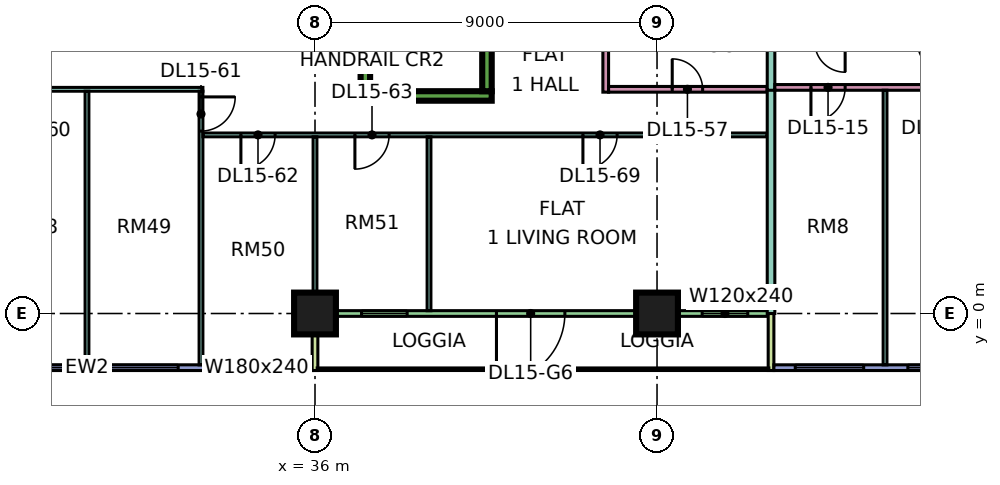
"""IFC4 building model, lengths in metres.
Left out: names, types, materials, properties, quantities, classifications, styles, units other than length and angle.
Written with IfcOpenShell. Run it as: python <this file> out.ifc"""

import sys

from ifc_helpers import new_model, si_unit, direction, frame, frame_2d, origin, origin_2d, place, context, subcontext, project, spatial, rectangle, extrude, element, fill, save


model = new_model("IFC4")
c1 = context("Model", 3, precision=1e-05, world=origin(), true_north=direction((0.0, 1.0)))
c2 = subcontext(c1, "Body", "Model", "MODEL_VIEW")
j1 = project(units=[si_unit("LENGTHUNIT", "METRE"), si_unit("PLANEANGLEUNIT", "RADIAN")], contexts=[c1])
p1 = place(None, origin())
s1 = spatial("IfcSite", under=j1, at=p1, CompositionType="ELEMENT")
p2 = place(p1, origin())
s2 = spatial("IfcBuilding", under=s1, at=p2, CompositionType="ELEMENT")
p3 = place(p2, frame((0.0, 0.0, 71.4)))
s3 = spatial("IfcBuildingStorey", under=s2, at=p3, CompositionType="ELEMENT", Elevation=71.4)
for number, where, z_axis, x_axis in (
    (1, (36.0, 0.0, 0.0), (0.0, 0.0, 1.0), (1.0, 0.0, 0.0)),
    (2, (45.0, 0.0, 0.0), (0.0, 0.0, 1.0), (1.0, 0.0, 0.0)),
):
    element("IfcColumn", number, at=place(p3, frame(where, z_axis=z_axis, x_axis=x_axis)), inside=s3, PredefinedType="COLUMN", context=c2, shape_type="SweptSolid", body=[
        extrude(rectangle(XDim=1.1, YDim=1.1, at=origin_2d()), origin(), (0.0, 0.0, 1.0), 3.75),
    ])
p4 = place(p3, frame((37.2, 5.725, 0.0), z_axis=(0.0, 0.0, 1.0), x_axis=(1.0, 0.0, 0.0)))
e3 = element("IfcWall", 3, at=p4, inside=s3, PredefinedType="SHEAR", context=c2, shape_type="SweptSolid", body=[
    extrude(rectangle(XDim=3.45, YDim=0.25, at=frame_2d((1.725, 0.0))), origin(), (0.0, 0.0, 1.0), 3.75),
])
for number, where, z_axis, x_axis in (
    (4, (37.325, 5.85, 0.0), (0.0, 0.0, 1.0), (0.0, 1.0, 0.0)),
    (5, (40.525, 5.85, 0.0), (0.0, 0.0, 1.0), (0.0, 1.0, 0.0)),
):
    element("IfcWall", number, at=place(p3, frame(where, z_axis=z_axis, x_axis=x_axis)), inside=s3, PredefinedType="SHEAR", context=c2, shape_type="SweptSolid", body=[
        extrude(rectangle(XDim=6.5, YDim=0.25, at=frame_2d((3.25, 0.0))), origin(), (0.0, 0.0, 1.0), 3.75),
    ])
p5 = place(p3, frame((24.075, -1.425, 0.0), z_axis=(0.0, 0.0, 1.0), x_axis=(1.0, 0.0, 0.0)))
e6 = element("IfcWall", 6, at=p5, inside=s3, PredefinedType="SOLIDWALL", context=c2, shape_type="SweptSolid", body=[
    extrude(rectangle(XDim=11.85, YDim=0.15, at=frame_2d((5.925, 0.0))), origin(), (0.0, 0.0, 1.0), 3.35),
])
p6 = place(p5, frame((0.562, 0.0, 0.45)))
e7 = element("IfcOpeningElement", 7, at=p6, cuts=e6, PredefinedType="OPENING", context=c2, shape_type="SweptSolid", body=[
    extrude(rectangle(XDim=1.8, YDim=2.4, at=frame_2d((0.9, 1.2))), frame((0.0, 0.085, 0.0), z_axis=(0.0, -1.0, 0.0), x_axis=(1.0, 0.0, 0.0)), (0.0, 0.0, 1.0), 0.17),
])
p7 = place(p5, frame((3.525, 0.0, 0.45)))
e8 = element("IfcOpeningElement", 8, at=p7, cuts=e6, PredefinedType="OPENING", context=c2, shape_type="SweptSolid", body=[
    extrude(rectangle(XDim=1.8, YDim=2.4, at=frame_2d((0.9, 1.2))), frame((0.0, 0.085, 0.0), z_axis=(0.0, -1.0, 0.0), x_axis=(1.0, 0.0, 0.0)), (0.0, 0.0, 1.0), 0.17),
])
p8 = place(p5, frame((6.525, 0.0, 0.45)))
e9 = element("IfcOpeningElement", 9, at=p8, cuts=e6, PredefinedType="OPENING", context=c2, shape_type="SweptSolid", body=[
    extrude(rectangle(XDim=1.8, YDim=2.4, at=frame_2d((0.9, 1.2))), frame((0.0, 0.085, 0.0), z_axis=(0.0, -1.0, 0.0), x_axis=(1.0, 0.0, 0.0)), (0.0, 0.0, 1.0), 0.17),
])
p9 = place(p5, frame((9.488, 0.0, 0.45)))
e10 = element("IfcOpeningElement", 10, at=p9, cuts=e6, PredefinedType="OPENING", context=c2, shape_type="SweptSolid", body=[
    extrude(rectangle(XDim=1.8, YDim=2.4, at=frame_2d((0.9, 1.2))), frame((0.0, 0.085, 0.0), z_axis=(0.0, -1.0, 0.0), x_axis=(1.0, 0.0, 0.0)), (0.0, 0.0, 1.0), 0.17),
])
p10 = place(p3, frame((36.075, 0.0, 0.0), z_axis=(0.0, 0.0, 1.0), x_axis=(1.0, 0.0, 0.0)))
e11 = element("IfcWall", 11, at=p10, inside=s3, PredefinedType="SOLIDWALL", context=c2, shape_type="SweptSolid", body=[
    extrude(rectangle(XDim=11.85, YDim=0.15, at=frame_2d((5.925, 0.0))), origin(), (0.0, 0.0, 1.0), 3.35),
])
p11 = place(p10, frame((1.15, 0.0, 0.45)))
e12 = element("IfcOpeningElement", 12, at=p11, cuts=e11, PredefinedType="OPENING", context=c2, shape_type="SweptSolid", body=[
    extrude(rectangle(XDim=1.2, YDim=2.4, at=frame_2d((0.6, 1.2))), frame((0.0, 0.085, 0.0), z_axis=(0.0, -1.0, 0.0), x_axis=(1.0, 0.0, 0.0)), (0.0, 0.0, 1.0), 0.17),
])
p12 = place(p10, frame((4.7, 0.0, 0.0)))
e13 = element("IfcOpeningElement", 13, at=p12, cuts=e11, PredefinedType="OPENING", context=c2, shape_type="SweptSolid", body=[
    extrude(rectangle(XDim=1.8, YDim=2.4, at=frame_2d((0.9, 1.2))), frame((0.0, 0.085, 0.0), z_axis=(0.0, -1.0, 0.0), x_axis=(1.0, 0.0, 0.0)), (0.0, 0.0, 1.0), 0.17),
])
p13 = place(p10, frame((10.113, 0.0, 0.45)))
e14 = element("IfcOpeningElement", 14, at=p13, cuts=e11, PredefinedType="OPENING", context=c2, shape_type="SweptSolid", body=[
    extrude(rectangle(XDim=1.2, YDim=2.4, at=frame_2d((0.6, 1.2))), frame((0.0, 0.085, 0.0), z_axis=(0.0, -1.0, 0.0), x_axis=(1.0, 0.0, 0.0)), (0.0, 0.0, 1.0), 0.17),
])
for number, where, z_axis, x_axis in (
    (15, (36.0, -1.5, 0.0), (0.0, 0.0, 1.0), (0.0, 1.0, 0.0)),
    (16, (48.0, -1.5, 0.0), (0.0, 0.0, 1.0), (0.0, 1.0, 0.0)),
):
    element("IfcWall", number, at=place(p3, frame(where, z_axis=z_axis, x_axis=x_axis)), inside=s3, PredefinedType="SOLIDWALL", context=c2, shape_type="SweptSolid", body=[
        extrude(rectangle(XDim=1.5, YDim=0.15, at=frame_2d((0.75, 0.0))), origin(), (0.0, 0.0, 1.0), 3.35),
    ])
p14 = place(p3, frame((48.075, -1.425, 0.0), z_axis=(0.0, 0.0, 1.0), x_axis=(1.0, 0.0, 0.0)))
e17 = element("IfcWall", 17, at=p14, inside=s3, PredefinedType="SOLIDWALL", context=c2, shape_type="SweptSolid", body=[
    extrude(rectangle(XDim=11.85, YDim=0.15, at=frame_2d((5.925, 0.0))), origin(), (0.0, 0.0, 1.0), 3.35),
])
p15 = place(p14, frame((0.562, 0.0, 0.45)))
e18 = element("IfcOpeningElement", 18, at=p15, cuts=e17, PredefinedType="OPENING", context=c2, shape_type="SweptSolid", body=[
    extrude(rectangle(XDim=1.8, YDim=2.4, at=frame_2d((0.9, 1.2))), frame((0.0, 0.085, 0.0), z_axis=(0.0, -1.0, 0.0), x_axis=(1.0, 0.0, 0.0)), (0.0, 0.0, 1.0), 0.17),
])
p16 = place(p14, frame((3.525, 0.0, 0.45)))
e19 = element("IfcOpeningElement", 19, at=p16, cuts=e17, PredefinedType="OPENING", context=c2, shape_type="SweptSolid", body=[
    extrude(rectangle(XDim=1.8, YDim=2.4, at=frame_2d((0.9, 1.2))), frame((0.0, 0.085, 0.0), z_axis=(0.0, -1.0, 0.0), x_axis=(1.0, 0.0, 0.0)), (0.0, 0.0, 1.0), 0.17),
])
p17 = place(p14, frame((6.525, 0.0, 0.45)))
e20 = element("IfcOpeningElement", 20, at=p17, cuts=e17, PredefinedType="OPENING", context=c2, shape_type="SweptSolid", body=[
    extrude(rectangle(XDim=1.8, YDim=2.4, at=frame_2d((0.9, 1.2))), frame((0.0, 0.085, 0.0), z_axis=(0.0, -1.0, 0.0), x_axis=(1.0, 0.0, 0.0)), (0.0, 0.0, 1.0), 0.17),
])
p18 = place(p14, frame((9.488, 0.0, 0.45)))
e21 = element("IfcOpeningElement", 21, at=p18, cuts=e17, PredefinedType="OPENING", context=c2, shape_type="SweptSolid", body=[
    extrude(rectangle(XDim=1.8, YDim=2.4, at=frame_2d((0.9, 1.2))), frame((0.0, 0.085, 0.0), z_axis=(0.0, -1.0, 0.0), x_axis=(1.0, 0.0, 0.0)), (0.0, 0.0, 1.0), 0.17),
])
p19 = place(p3, frame((11.95, 5.9, 0.0), z_axis=(0.0, 0.0, 1.0), x_axis=(1.0, 0.0, 0.0)))
e22 = element("IfcWall", 22, at=p19, inside=s3, PredefinedType="PARTITIONING", context=c2, shape_type="SweptSolid", body=[
    extrude(rectangle(XDim=21.1, YDim=0.1, at=frame_2d((10.55, 0.0))), origin(), (0.0, 0.0, 1.0), 3.35),
])
p20 = place(p19, frame((10.1, 0.0, 0.0)))
e23 = element("IfcOpeningElement", 23, at=p20, cuts=e22, PredefinedType="OPENING", context=c2, shape_type="SweptSolid", body=[
    extrude(rectangle(XDim=0.9, YDim=2.1, at=frame_2d((0.45, 1.05))), frame((0.0, 0.06, 0.0), z_axis=(0.0, -1.0, 0.0), x_axis=(1.0, 0.0, 0.0)), (0.0, 0.0, 1.0), 0.12),
])
p21 = place(p19, frame((13.1, 0.0, 0.0)))
e24 = element("IfcOpeningElement", 24, at=p21, cuts=e22, PredefinedType="OPENING", context=c2, shape_type="SweptSolid", body=[
    extrude(rectangle(XDim=0.9, YDim=2.1, at=frame_2d((0.45, 1.05))), frame((0.0, 0.06, 0.0), z_axis=(0.0, -1.0, 0.0), x_axis=(1.0, 0.0, 0.0)), (0.0, 0.0, 1.0), 0.12),
])
p22 = place(p19, frame((16.1, 0.0, 0.0)))
e25 = element("IfcOpeningElement", 25, at=p22, cuts=e22, PredefinedType="OPENING", context=c2, shape_type="SweptSolid", body=[
    extrude(rectangle(XDim=0.9, YDim=2.1, at=frame_2d((0.45, 1.05))), frame((0.0, 0.06, 0.0), z_axis=(0.0, -1.0, 0.0), x_axis=(1.0, 0.0, 0.0)), (0.0, 0.0, 1.0), 0.12),
])
p23 = place(p19, frame((4.1, 0.0, 0.0)))
e26 = element("IfcOpeningElement", 26, at=p23, cuts=e22, PredefinedType="OPENING", context=c2, shape_type="SweptSolid", body=[
    extrude(rectangle(XDim=0.9, YDim=2.1, at=frame_2d((0.45, 1.05))), frame((0.0, 0.06, 0.0), z_axis=(0.0, -1.0, 0.0), x_axis=(1.0, 0.0, 0.0)), (0.0, 0.0, 1.0), 0.12),
])
p24 = place(p3, frame((30.0, -1.351, 0.0), z_axis=(0.0, 0.0, 1.0), x_axis=(0.0, 1.0, 0.0)))
e27 = element("IfcWall", 27, at=p24, inside=s3, PredefinedType="PARTITIONING", context=c2, shape_type="SweptSolid", body=[
    extrude(rectangle(XDim=7.201, YDim=0.1, at=frame_2d((3.601, 0.0))), origin(), (0.0, 0.0, 1.0), 3.35),
])
p25 = place(p3, frame((33.0, -1.351, 0.0), z_axis=(0.0, 0.0, 1.0), x_axis=(0.0, 1.0, 0.0)))
e28 = element("IfcWall", 28, at=p25, inside=s3, PredefinedType="PARTITIONING", context=c2, shape_type="SweptSolid", body=[
    extrude(rectangle(XDim=7.201, YDim=0.1, at=frame_2d((3.601, 0.0))), origin(), (0.0, 0.0, 1.0), 3.35),
])
p26 = place(p25, frame((6.151, 0.0, 0.0)))
e29 = element("IfcOpeningElement", 29, at=p26, cuts=e28, PredefinedType="OPENING", context=c2, shape_type="SweptSolid", body=[
    extrude(rectangle(XDim=0.9, YDim=2.1, at=frame_2d((0.45, 1.05))), frame((0.0, 0.06, 0.0), z_axis=(0.0, -1.0, 0.0), x_axis=(1.0, 0.0, 0.0)), (0.0, 0.0, 1.0), 0.12),
])
p27 = place(p3, frame((33.05, 4.7, 0.0), z_axis=(0.0, 0.0, 1.0), x_axis=(1.0, 0.0, 0.0)))
e30 = element("IfcWall", 30, at=p27, inside=s3, PredefinedType="PARTITIONING", context=c2, shape_type="SweptSolid", body=[
    extrude(rectangle(XDim=14.85, YDim=0.1, at=frame_2d((7.425, 0.0))), origin(), (0.0, 0.0, 1.0), 3.35),
])
p28 = place(p27, frame((1.0, 0.0, 0.0)))
e31 = element("IfcOpeningElement", 31, at=p28, cuts=e30, PredefinedType="OPENING", context=c2, shape_type="SweptSolid", body=[
    extrude(rectangle(XDim=0.9, YDim=2.1, at=frame_2d((0.45, 1.05))), frame((0.0, 0.06, 0.0), z_axis=(0.0, -1.0, 0.0), x_axis=(1.0, 0.0, 0.0)), (0.0, 0.0, 1.0), 0.12),
])
p29 = place(p27, frame((4.0, 0.0, 0.0)))
e32 = element("IfcOpeningElement", 32, at=p29, cuts=e30, PredefinedType="OPENING", context=c2, shape_type="SweptSolid", body=[
    extrude(rectangle(XDim=0.9, YDim=2.1, at=frame_2d((0.45, 1.05))), frame((0.0, 0.06, 0.0), z_axis=(0.0, -1.0, 0.0), x_axis=(1.0, 0.0, 0.0)), (0.0, 0.0, 1.0), 0.12),
])
p30 = place(p27, frame((10.0, 0.0, 0.0)))
e33 = element("IfcOpeningElement", 33, at=p30, cuts=e30, PredefinedType="OPENING", context=c2, shape_type="SweptSolid", body=[
    extrude(rectangle(XDim=0.9, YDim=2.1, at=frame_2d((0.45, 1.05))), frame((0.0, 0.06, 0.0), z_axis=(0.0, -1.0, 0.0), x_axis=(1.0, 0.0, 0.0)), (0.0, 0.0, 1.0), 0.12),
])
p31 = place(p3, frame((36.0, 0.0, 0.0), z_axis=(0.0, 0.0, 1.0), x_axis=(0.0, 1.0, 0.0)))
e34 = element("IfcWall", 34, at=p31, inside=s3, PredefinedType="PARTITIONING", context=c2, shape_type="SweptSolid", body=[
    extrude(rectangle(XDim=4.65, YDim=0.1, at=frame_2d((2.325, 0.0))), origin(), (0.0, 0.0, 1.0), 3.35),
])
p32 = place(p3, frame((39.0, 0.074, 0.0), z_axis=(0.0, 0.0, 1.0), x_axis=(0.0, 1.0, 0.0)))
e35 = element("IfcWall", 35, at=p32, inside=s3, PredefinedType="PARTITIONING", context=c2, shape_type="SweptSolid", body=[
    extrude(rectangle(XDim=4.576, YDim=0.1, at=frame_2d((2.288, 0.0))), origin(), (0.0, 0.0, 1.0), 3.35),
])
p33 = place(p3, frame((43.65, 5.825, 0.0), z_axis=(0.0, 0.0, 1.0), x_axis=(0.0, 1.0, 0.0)))
e36 = element("IfcWall", 36, at=p33, inside=s3, PredefinedType="PARTITIONING", context=c2, shape_type="SweptSolid", body=[
    extrude(rectangle(XDim=6.625, YDim=0.15, at=frame_2d((3.312, 0.0))), origin(), (0.0, 0.0, 1.0), 3.35),
])
p34 = place(p33, frame((4.425, 0.0, 0.0)))
e37 = element("IfcOpeningElement", 37, at=p34, cuts=e36, PredefinedType="OPENING", context=c2, shape_type="SweptSolid", body=[
    extrude(rectangle(XDim=0.9, YDim=2.1, at=frame_2d((0.45, 1.05))), frame((0.0, 0.085, 0.0), z_axis=(0.0, -1.0, 0.0), x_axis=(1.0, 0.0, 0.0)), (0.0, 0.0, 1.0), 0.17),
])
p35 = place(p3, frame((43.725, 5.9, 0.0), z_axis=(0.0, 0.0, 1.0), x_axis=(1.0, 0.0, 0.0)))
e38 = element("IfcWall", 38, at=p35, inside=s3, PredefinedType="PARTITIONING", context=c2, shape_type="SweptSolid", body=[
    extrude(rectangle(XDim=4.175, YDim=0.15, at=frame_2d((2.087, 0.0))), origin(), (0.0, 0.0, 1.0), 3.35),
])
p36 = place(p35, frame((1.675, 0.0, 0.0)))
e39 = element("IfcOpeningElement", 39, at=p36, cuts=e38, PredefinedType="OPENING", context=c2, shape_type="SweptSolid", body=[
    extrude(rectangle(XDim=0.8, YDim=2.1, at=frame_2d((0.4, 1.05))), frame((0.0, 0.085, 0.0), z_axis=(0.0, -1.0, 0.0), x_axis=(1.0, 0.0, 0.0)), (0.0, 0.0, 1.0), 0.17),
])
p37 = place(p3, frame((48.0, 0.0, 0.0), z_axis=(0.0, 0.0, 1.0), x_axis=(0.0, 1.0, 0.0)))
e40 = element("IfcWall", 40, at=p37, inside=s3, PredefinedType="PARTITIONING", context=c2, shape_type="SweptSolid", body=[
    extrude(rectangle(XDim=5.975, YDim=0.2, at=frame_2d((2.988, 0.0))), origin(), (0.0, 0.0, 1.0), 3.35),
])
p38 = place(p3, frame((48.0, 5.875, 0.0), z_axis=(0.0, 0.0, 1.0), x_axis=(0.0, 1.0, 0.0)))
e41 = element("IfcWall", 41, at=p38, inside=s3, PredefinedType="PARTITIONING", context=c2, shape_type="SweptSolid", body=[
    extrude(rectangle(XDim=6.575, YDim=0.2, at=frame_2d((3.288, 0.0))), origin(), (0.0, 0.0, 1.0), 3.35),
])
p39 = place(p3, frame((48.1, 5.95, 0.0), z_axis=(0.0, 0.0, 1.0), x_axis=(1.0, 0.0, 0.0)))
e42 = element("IfcWall", 42, at=p39, inside=s3, PredefinedType="PARTITIONING", context=c2, shape_type="SweptSolid", body=[
    extrude(rectangle(XDim=25.25, YDim=0.15, at=frame_2d((12.625, 0.0))), origin(), (0.0, 0.0, 1.0), 3.35),
])
p40 = place(p39, frame((0.95, 0.0, 0.0)))
e43 = element("IfcOpeningElement", 43, at=p40, cuts=e42, PredefinedType="OPENING", context=c2, shape_type="SweptSolid", body=[
    extrude(rectangle(XDim=0.9, YDim=2.1, at=frame_2d((0.45, 1.05))), frame((0.0, 0.085, 0.0), z_axis=(0.0, -1.0, 0.0), x_axis=(1.0, 0.0, 0.0)), (0.0, 0.0, 1.0), 0.17),
])
p41 = place(p39, frame((3.95, 0.0, 0.0)))
e44 = element("IfcOpeningElement", 44, at=p41, cuts=e42, PredefinedType="OPENING", context=c2, shape_type="SweptSolid", body=[
    extrude(rectangle(XDim=0.9, YDim=2.1, at=frame_2d((0.45, 1.05))), frame((0.0, 0.085, 0.0), z_axis=(0.0, -1.0, 0.0), x_axis=(1.0, 0.0, 0.0)), (0.0, 0.0, 1.0), 0.17),
])
p42 = place(p39, frame((6.95, 0.0, 0.0)))
e45 = element("IfcOpeningElement", 45, at=p42, cuts=e42, PredefinedType="OPENING", context=c2, shape_type="SweptSolid", body=[
    extrude(rectangle(XDim=0.9, YDim=2.1, at=frame_2d((0.45, 1.05))), frame((0.0, 0.085, 0.0), z_axis=(0.0, -1.0, 0.0), x_axis=(1.0, 0.0, 0.0)), (0.0, 0.0, 1.0), 0.17),
])
p43 = place(p39, frame((9.95, 0.0, 0.0)))
e46 = element("IfcOpeningElement", 46, at=p43, cuts=e42, PredefinedType="OPENING", context=c2, shape_type="SweptSolid", body=[
    extrude(rectangle(XDim=0.9, YDim=2.1, at=frame_2d((0.45, 1.05))), frame((0.0, 0.085, 0.0), z_axis=(0.0, -1.0, 0.0), x_axis=(1.0, 0.0, 0.0)), (0.0, 0.0, 1.0), 0.17),
])
p44 = place(p39, frame((17.45, 0.0, 0.0)))
e47 = element("IfcOpeningElement", 47, at=p44, cuts=e42, PredefinedType="OPENING", context=c2, shape_type="SweptSolid", body=[
    extrude(rectangle(XDim=0.9, YDim=2.1, at=frame_2d((0.45, 1.05))), frame((0.0, 0.085, 0.0), z_axis=(0.0, -1.0, 0.0), x_axis=(1.0, 0.0, 0.0)), (0.0, 0.0, 1.0), 0.17),
])
p45 = place(p39, frame((13.8, 0.0, 0.0)))
e48 = element("IfcOpeningElement", 48, at=p45, cuts=e42, PredefinedType="OPENING", context=c2, shape_type="SweptSolid", body=[
    extrude(rectangle(XDim=0.8, YDim=2.1, at=frame_2d((0.4, 1.05))), frame((0.0, 0.085, 0.0), z_axis=(0.0, -1.0, 0.0), x_axis=(1.0, 0.0, 0.0)), (0.0, 0.0, 1.0), 0.17),
])
p46 = place(p39, frame((21.65, 0.0, 0.0)))
e49 = element("IfcOpeningElement", 49, at=p46, cuts=e42, PredefinedType="OPENING", context=c2, shape_type="SweptSolid", body=[
    extrude(rectangle(XDim=1.6, YDim=2.1, at=frame_2d((0.8, 1.05))), frame((0.0, 0.085, 0.0), z_axis=(0.0, -1.0, 0.0), x_axis=(1.0, 0.0, 0.0)), (0.0, 0.0, 1.0), 0.17),
])
p47 = place(p3, frame((51.0, -1.351, 0.0), z_axis=(0.0, 0.0, 1.0), x_axis=(0.0, 1.0, 0.0)))
e50 = element("IfcWall", 50, at=p47, inside=s3, PredefinedType="PARTITIONING", context=c2, shape_type="SweptSolid", body=[
    extrude(rectangle(XDim=7.226, YDim=0.1, at=frame_2d((3.613, 0.0))), origin(), (0.0, 0.0, 1.0), 3.35),
])
p48 = place(p7, origin())
e51 = element("IfcWindow", 51, at=p48, inside=s3, PartitioningType="SINGLE_PANEL", PredefinedType="WINDOW", context=c2, shape_type="SweptSolid", body=[
    extrude(rectangle(XDim=1.8, YDim=2.4, at=frame_2d((0.9, 1.2))), frame((0.0, 0.03, 0.0), z_axis=(0.0, -1.0, 0.0), x_axis=(1.0, 0.0, 0.0)), (0.0, 0.0, 1.0), 0.06),
])
fill(e8, e51)
p49 = place(p8, origin())
e52 = element("IfcWindow", 52, at=p49, inside=s3, PartitioningType="SINGLE_PANEL", PredefinedType="WINDOW", context=c2, shape_type="SweptSolid", body=[
    extrude(rectangle(XDim=1.8, YDim=2.4, at=frame_2d((0.9, 1.2))), frame((0.0, 0.03, 0.0), z_axis=(0.0, -1.0, 0.0), x_axis=(1.0, 0.0, 0.0)), (0.0, 0.0, 1.0), 0.06),
])
fill(e9, e52)
p50 = place(p9, origin())
e53 = element("IfcWindow", 53, at=p50, inside=s3, PartitioningType="SINGLE_PANEL", PredefinedType="WINDOW", context=c2, shape_type="SweptSolid", body=[
    extrude(rectangle(XDim=1.8, YDim=2.4, at=frame_2d((0.9, 1.2))), frame((0.0, 0.03, 0.0), z_axis=(0.0, -1.0, 0.0), x_axis=(1.0, 0.0, 0.0)), (0.0, 0.0, 1.0), 0.06),
])
fill(e10, e53)
p51 = place(p11, origin())
e54 = element("IfcWindow", 54, at=p51, inside=s3, PartitioningType="SINGLE_PANEL", PredefinedType="WINDOW", context=c2, shape_type="SweptSolid", body=[
    extrude(rectangle(XDim=1.2, YDim=2.4, at=frame_2d((0.6, 1.2))), frame((0.0, 0.03, 0.0), z_axis=(0.0, -1.0, 0.0), x_axis=(1.0, 0.0, 0.0)), (0.0, 0.0, 1.0), 0.06),
])
fill(e12, e54)
p52 = place(p12, frame((1.8, 0.0, 0.0), z_axis=(0.0, 0.0, 1.0), x_axis=(-1.0, 0.0, 0.0)))
e55 = element("IfcDoor", 55, at=p52, inside=s3, OperationType="DOUBLE_DOOR_SINGLE_SWING", PredefinedType="DOOR", context=c2, shape_type="SweptSolid", body=[
    extrude(rectangle(XDim=1.8, YDim=2.4, at=frame_2d((0.9, 1.2))), frame((0.0, 0.025, 0.0), z_axis=(0.0, -1.0, 0.0), x_axis=(1.0, 0.0, 0.0)), (0.0, 0.0, 1.0), 0.05),
])
fill(e13, e55)
p53 = place(p13, origin())
e56 = element("IfcWindow", 56, at=p53, inside=s3, PartitioningType="SINGLE_PANEL", PredefinedType="WINDOW", context=c2, shape_type="SweptSolid", body=[
    extrude(rectangle(XDim=1.2, YDim=2.4, at=frame_2d((0.6, 1.2))), frame((0.0, 0.03, 0.0), z_axis=(0.0, -1.0, 0.0), x_axis=(1.0, 0.0, 0.0)), (0.0, 0.0, 1.0), 0.06),
])
fill(e14, e56)
p54 = place(p15, origin())
e57 = element("IfcWindow", 57, at=p54, inside=s3, PartitioningType="SINGLE_PANEL", PredefinedType="WINDOW", context=c2, shape_type="SweptSolid", body=[
    extrude(rectangle(XDim=1.8, YDim=2.4, at=frame_2d((0.9, 1.2))), frame((0.0, 0.03, 0.0), z_axis=(0.0, -1.0, 0.0), x_axis=(1.0, 0.0, 0.0)), (0.0, 0.0, 1.0), 0.06),
])
fill(e18, e57)
p55 = place(p16, origin())
e58 = element("IfcWindow", 58, at=p55, inside=s3, PartitioningType="SINGLE_PANEL", PredefinedType="WINDOW", context=c2, shape_type="SweptSolid", body=[
    extrude(rectangle(XDim=1.8, YDim=2.4, at=frame_2d((0.9, 1.2))), frame((0.0, 0.03, 0.0), z_axis=(0.0, -1.0, 0.0), x_axis=(1.0, 0.0, 0.0)), (0.0, 0.0, 1.0), 0.06),
])
fill(e19, e58)
p56 = place(p40, frame((0.9, 0.0, 0.0), z_axis=(0.0, 0.0, 1.0), x_axis=(-1.0, 0.0, 0.0)))
e59 = element("IfcDoor", 59, at=p56, inside=s3, OperationType="SINGLE_SWING_LEFT", PredefinedType="DOOR", context=c2, shape_type="SweptSolid", body=[
    extrude(rectangle(XDim=0.9, YDim=2.1, at=frame_2d((0.45, 1.05))), frame((0.0, 0.025, 0.0), z_axis=(0.0, -1.0, 0.0), x_axis=(1.0, 0.0, 0.0)), (0.0, 0.0, 1.0), 0.05),
])
fill(e43, e59)
p57 = place(p36, origin())
e60 = element("IfcDoor", 60, at=p57, inside=s3, OperationType="SINGLE_SWING_LEFT", PredefinedType="DOOR", context=c2, shape_type="SweptSolid", body=[
    extrude(rectangle(XDim=0.8, YDim=2.1, at=frame_2d((0.4, 1.05))), frame((0.0, 0.025, 0.0), z_axis=(0.0, -1.0, 0.0), x_axis=(1.0, 0.0, 0.0)), (0.0, 0.0, 1.0), 0.05),
])
fill(e39, e60)
p58 = place(p26, origin())
e61 = element("IfcDoor", 61, at=p58, inside=s3, OperationType="SINGLE_SWING_RIGHT", PredefinedType="DOOR", context=c2, shape_type="SweptSolid", body=[
    extrude(rectangle(XDim=0.9, YDim=2.1, at=frame_2d((0.45, 1.05))), frame((0.0, 0.025, 0.0), z_axis=(0.0, -1.0, 0.0), x_axis=(1.0, 0.0, 0.0)), (0.0, 0.0, 1.0), 0.05),
])
fill(e29, e61)
p59 = place(p28, frame((0.9, 0.0, 0.0), z_axis=(0.0, 0.0, 1.0), x_axis=(-1.0, 0.0, 0.0)))
e62 = element("IfcDoor", 62, at=p59, inside=s3, OperationType="SINGLE_SWING_LEFT", PredefinedType="DOOR", context=c2, shape_type="SweptSolid", body=[
    extrude(rectangle(XDim=0.9, YDim=2.1, at=frame_2d((0.45, 1.05))), frame((0.0, 0.025, 0.0), z_axis=(0.0, -1.0, 0.0), x_axis=(1.0, 0.0, 0.0)), (0.0, 0.0, 1.0), 0.05),
])
fill(e31, e62)
p60 = place(p29, frame((0.9, 0.0, 0.0), z_axis=(0.0, 0.0, 1.0), x_axis=(-1.0, 0.0, 0.0)))
e63 = element("IfcDoor", 63, at=p60, inside=s3, OperationType="SINGLE_SWING_LEFT", PredefinedType="DOOR", context=c2, shape_type="SweptSolid", body=[
    extrude(rectangle(XDim=0.9, YDim=2.1, at=frame_2d((0.45, 1.05))), frame((0.0, 0.025, 0.0), z_axis=(0.0, -1.0, 0.0), x_axis=(1.0, 0.0, 0.0)), (0.0, 0.0, 1.0), 0.05),
])
fill(e32, e63)
p61 = place(p30, frame((0.9, 0.0, 0.0), z_axis=(0.0, 0.0, 1.0), x_axis=(-1.0, 0.0, 0.0)))
e64 = element("IfcDoor", 64, at=p61, inside=s3, OperationType="SINGLE_SWING_LEFT", PredefinedType="DOOR", context=c2, shape_type="SweptSolid", body=[
    extrude(rectangle(XDim=0.9, YDim=2.1, at=frame_2d((0.45, 1.05))), frame((0.0, 0.025, 0.0), z_axis=(0.0, -1.0, 0.0), x_axis=(1.0, 0.0, 0.0)), (0.0, 0.0, 1.0), 0.05),
])
fill(e33, e64)
save(model, sys.argv[1])
